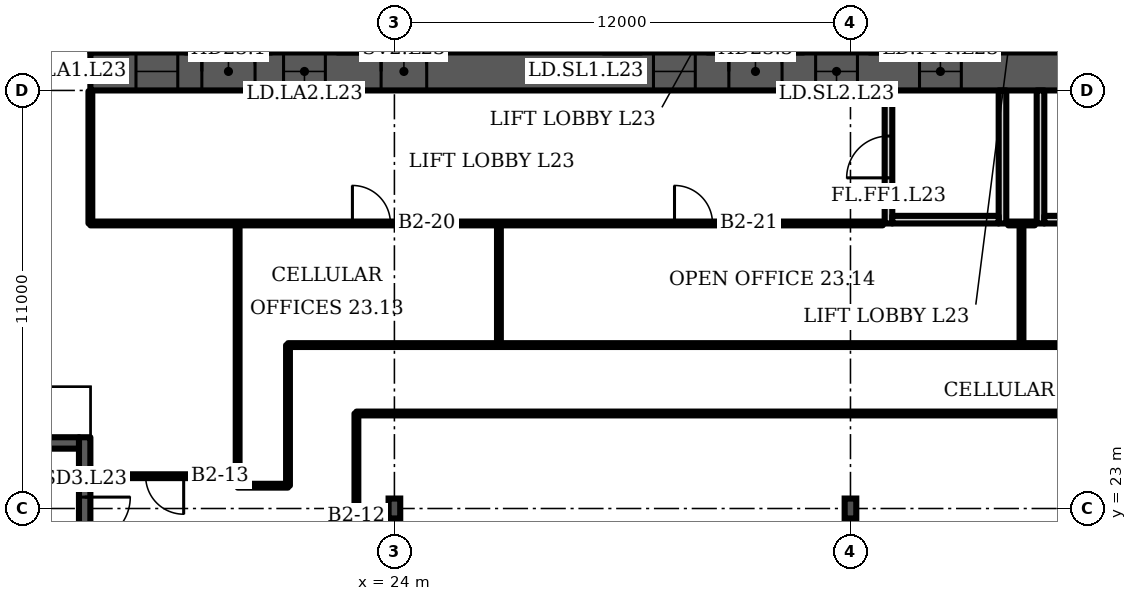
"""IFC4 building model, lengths in metres.
Left out: names, types, materials, properties, quantities, classifications, styles, units other than length and angle.
Written with IfcOpenShell. Run it as: python <this file> out.ifc"""

import sys

from ifc_helpers import new_model, si_unit, direction, frame, frame_2d, origin, origin_2d, place, context, subcontext, project, spatial, rectangle, i_section, extrude, element, fill, save


model = new_model("IFC4")
c1 = context("Model", 3, precision=1e-05, world=origin(), true_north=direction((0.0, 1.0)))
c2 = subcontext(c1, "Body", "Model", "MODEL_VIEW")
j1 = project(units=[si_unit("LENGTHUNIT", "METRE"), si_unit("PLANEANGLEUNIT", "RADIAN")], contexts=[c1])
p1 = place(None, origin())
s1 = spatial("IfcSite", under=j1, at=p1, CompositionType="ELEMENT")
p2 = place(p1, origin())
s2 = spatial("IfcBuilding", under=s1, at=p2, CompositionType="ELEMENT")
p3 = place(p2, frame((0.0, 0.0, 103.9)))
s3 = spatial("IfcBuildingStorey", under=s2, at=p3, CompositionType="ELEMENT", Elevation=103.9)
p4 = place(p3, frame((16.0, 34.5, 0.0), z_axis=(0.0, 0.0, 1.0), x_axis=(1.0, 0.0, 0.0)))
e1 = element("IfcWall", 1, at=p4, inside=s3, PredefinedType="SHEAR", context=c2, shape_type="SweptSolid", body=[
    extrude(rectangle(XDim=49.0, YDim=1.0, at=frame_2d((24.5, 0.0))), origin(), (0.0, 0.0, 1.0), 3.6),
])
p5 = place(p4, frame((1.2, 0.0, 0.0)))
e2 = element("IfcOpeningElement", 2, at=p5, cuts=e1, PredefinedType="OPENING", context=c2, shape_type="SweptSolid", body=[
    extrude(rectangle(XDim=1.1, YDim=2.1, at=frame_2d((0.55, 1.05))), frame((0.0, 0.51, 0.0), z_axis=(0.0, -1.0, 0.0), x_axis=(1.0, 0.0, 0.0)), (0.0, 0.0, 1.0), 1.02),
])
p6 = place(p4, frame((5.083, 0.0, 0.0)))
e3 = element("IfcOpeningElement", 3, at=p6, cuts=e1, PredefinedType="OPENING", context=c2, shape_type="SweptSolid", body=[
    extrude(rectangle(XDim=1.1, YDim=2.1, at=frame_2d((0.55, 1.05))), frame((0.0, 0.51, 0.0), z_axis=(0.0, -1.0, 0.0), x_axis=(1.0, 0.0, 0.0)), (0.0, 0.0, 1.0), 1.02),
])
p7 = place(p4, frame((2.933, 0.0, 0.0)))
e4 = element("IfcOpeningElement", 4, at=p7, cuts=e1, PredefinedType="OPENING", context=c2, shape_type="SweptSolid", body=[
    extrude(rectangle(XDim=1.4, YDim=2.1, at=frame_2d((0.7, 1.05))), frame((0.0, 0.51, 0.0), z_axis=(0.0, -1.0, 0.0), x_axis=(1.0, 0.0, 0.0)), (0.0, 0.0, 1.0), 1.02),
])
p8 = place(p4, frame((7.65, 0.0, 0.0)))
e5 = element("IfcOpeningElement", 5, at=p8, cuts=e1, PredefinedType="OPENING", context=c2, shape_type="SweptSolid", body=[
    extrude(rectangle(XDim=1.2, YDim=2.1, at=frame_2d((0.6, 1.05))), frame((0.0, 0.51, 0.0), z_axis=(0.0, -1.0, 0.0), x_axis=(1.0, 0.0, 0.0)), (0.0, 0.0, 1.0), 1.02),
])
p9 = place(p4, frame((14.817, 0.0, 0.0)))
e6 = element("IfcOpeningElement", 6, at=p9, cuts=e1, PredefinedType="OPENING", context=c2, shape_type="SweptSolid", body=[
    extrude(rectangle(XDim=1.1, YDim=2.1, at=frame_2d((0.55, 1.05))), frame((0.0, 0.51, 0.0), z_axis=(0.0, -1.0, 0.0), x_axis=(1.0, 0.0, 0.0)), (0.0, 0.0, 1.0), 1.02),
])
p10 = place(p4, frame((19.083, 0.0, 0.0)))
e7 = element("IfcOpeningElement", 7, at=p10, cuts=e1, PredefinedType="OPENING", context=c2, shape_type="SweptSolid", body=[
    extrude(rectangle(XDim=1.1, YDim=2.1, at=frame_2d((0.55, 1.05))), frame((0.0, 0.51, 0.0), z_axis=(0.0, -1.0, 0.0), x_axis=(1.0, 0.0, 0.0)), (0.0, 0.0, 1.0), 1.02),
])
p11 = place(p4, frame((16.8, 0.0, 0.0)))
e8 = element("IfcOpeningElement", 8, at=p11, cuts=e1, PredefinedType="OPENING", context=c2, shape_type="SweptSolid", body=[
    extrude(rectangle(XDim=1.4, YDim=2.1, at=frame_2d((0.7, 1.05))), frame((0.0, 0.51, 0.0), z_axis=(0.0, -1.0, 0.0), x_axis=(1.0, 0.0, 0.0)), (0.0, 0.0, 1.0), 1.02),
])
p12 = place(p4, frame((21.817, 0.0, 0.0)))
e9 = element("IfcOpeningElement", 9, at=p12, cuts=e1, PredefinedType="OPENING", context=c2, shape_type="SweptSolid", body=[
    extrude(rectangle(XDim=1.1, YDim=2.1, at=frame_2d((0.55, 1.05))), frame((0.0, 0.51, 0.0), z_axis=(0.0, -1.0, 0.0), x_axis=(1.0, 0.0, 0.0)), (0.0, 0.0, 1.0), 1.02),
])
p13 = place(p4, frame((26.083, 0.0, 0.0)))
e10 = element("IfcOpeningElement", 10, at=p13, cuts=e1, PredefinedType="OPENING", context=c2, shape_type="SweptSolid", body=[
    extrude(rectangle(XDim=1.1, YDim=2.1, at=frame_2d((0.55, 1.05))), frame((0.0, 0.51, 0.0), z_axis=(0.0, -1.0, 0.0), x_axis=(1.0, 0.0, 0.0)), (0.0, 0.0, 1.0), 1.02),
])
p14 = place(p4, frame((33.15, 0.0, 0.0)))
e11 = element("IfcOpeningElement", 11, at=p14, cuts=e1, PredefinedType="OPENING", context=c2, shape_type="SweptSolid", body=[
    extrude(rectangle(XDim=1.2, YDim=2.1, at=frame_2d((0.6, 1.05))), frame((0.0, 0.51, 0.0), z_axis=(0.0, -1.0, 0.0), x_axis=(1.0, 0.0, 0.0)), (0.0, 0.0, 1.0), 1.02),
])
p15 = place(p4, frame((37.8, 0.0, 0.0)))
e12 = element("IfcOpeningElement", 12, at=p15, cuts=e1, PredefinedType="OPENING", context=c2, shape_type="SweptSolid", body=[
    extrude(rectangle(XDim=1.4, YDim=2.1, at=frame_2d((0.7, 1.05))), frame((0.0, 0.51, 0.0), z_axis=(0.0, -1.0, 0.0), x_axis=(1.0, 0.0, 0.0)), (0.0, 0.0, 1.0), 1.02),
])
p16 = place(p4, frame((42.817, 0.0, 0.0)))
e13 = element("IfcOpeningElement", 13, at=p16, cuts=e1, PredefinedType="OPENING", context=c2, shape_type="SweptSolid", body=[
    extrude(rectangle(XDim=1.1, YDim=2.1, at=frame_2d((0.55, 1.05))), frame((0.0, 0.51, 0.0), z_axis=(0.0, -1.0, 0.0), x_axis=(1.0, 0.0, 0.0)), (0.0, 0.0, 1.0), 1.02),
])
p17 = place(p4, frame((46.7, 0.0, 0.0)))
e14 = element("IfcOpeningElement", 14, at=p17, cuts=e1, PredefinedType="OPENING", context=c2, shape_type="SweptSolid", body=[
    extrude(rectangle(XDim=1.1, YDim=2.1, at=frame_2d((0.55, 1.05))), frame((0.0, 0.51, 0.0), z_axis=(0.0, -1.0, 0.0), x_axis=(1.0, 0.0, 0.0)), (0.0, 0.0, 1.0), 1.02),
])
p18 = place(p4, frame((44.667, 0.0, 0.0)))
e15 = element("IfcOpeningElement", 15, at=p18, cuts=e1, PredefinedType="OPENING", context=c2, shape_type="SweptSolid", body=[
    extrude(rectangle(XDim=1.4, YDim=2.1, at=frame_2d((0.7, 1.05))), frame((0.0, 0.51, 0.0), z_axis=(0.0, -1.0, 0.0), x_axis=(1.0, 0.0, 0.0)), (0.0, 0.0, 1.0), 1.02),
])
for number, where, z_axis, x_axis in (
    (16, (24.0, 23.0, 0.0), (0.0, 0.0, 1.0), (1.0, 0.0, 0.0)),
    (17, (36.0, 23.0, 0.0), (0.0, 0.0, 1.0), (1.0, 0.0, 0.0)),
):
    element("IfcColumn", number, at=place(p3, frame(where, z_axis=z_axis, x_axis=x_axis)), inside=s3, PredefinedType="COLUMN", context=c2, shape_type="SweptSolid", body=[
        extrude(i_section(OverallWidth=0.306, OverallDepth=0.524, WebThickness=0.021, FlangeThickness=0.04, FilletRadius=0.027, at=origin_2d()), origin(), (0.0, 0.0, 1.0), 3.6),
    ])
p19 = place(p3, frame((37.0, 30.5, 0.0), z_axis=(0.0, 0.0, 1.0), x_axis=(0.0, 1.0, 0.0)))
e18 = element("IfcWall", 18, at=p19, inside=s3, PredefinedType="PARTITIONING", context=c2, shape_type="SweptSolid", body=[
    extrude(rectangle(XDim=3.5, YDim=0.2, at=frame_2d((1.75, 0.0))), origin(), (0.0, 0.0, 1.0), 3.2),
])
p20 = place(p19, frame((1.2, 0.0, 0.0)))
e19 = element("IfcOpeningElement", 19, at=p20, cuts=e18, PredefinedType="OPENING", context=c2, shape_type="SweptSolid", body=[
    extrude(rectangle(XDim=1.1, YDim=2.1, at=frame_2d((0.55, 1.05))), frame((0.0, 0.11, 0.0), z_axis=(0.0, -1.0, 0.0), x_axis=(1.0, 0.0, 0.0)), (0.0, 0.0, 1.0), 0.22),
])
p21 = place(p3, frame((40.0, 30.5, 0.0), z_axis=(0.0, 0.0, 1.0), x_axis=(0.0, 1.0, 0.0)))
e20 = element("IfcWall", 20, at=p21, inside=s3, PredefinedType="PARTITIONING", context=c2, shape_type="SweptSolid", body=[
    extrude(rectangle(XDim=3.5, YDim=0.2, at=frame_2d((1.75, 0.0))), origin(), (0.0, 0.0, 1.0), 3.2),
])
p22 = place(p3, frame((37.1, 30.6, 0.0), z_axis=(0.0, 0.0, 1.0), x_axis=(1.0, 0.0, 0.0)))
e21 = element("IfcWall", 21, at=p22, inside=s3, PredefinedType="PARTITIONING", context=c2, shape_type="SweptSolid", body=[
    extrude(rectangle(XDim=2.8, YDim=0.2, at=frame_2d((1.4, 0.0))), origin(), (0.0, 0.0, 1.0), 3.2),
])
p23 = place(p3, frame((41.0, 30.5, 0.0), z_axis=(0.0, 0.0, 1.0), x_axis=(0.0, 1.0, 0.0)))
e22 = element("IfcWall", 22, at=p23, inside=s3, PredefinedType="PARTITIONING", context=c2, shape_type="SweptSolid", body=[
    extrude(rectangle(XDim=3.5, YDim=0.2, at=frame_2d((1.75, 0.0))), origin(), (0.0, 0.0, 1.0), 3.2),
])
p24 = place(p3, frame((41.1, 30.6, 0.0), z_axis=(0.0, 0.0, 1.0), x_axis=(1.0, 0.0, 0.0)))
e23 = element("IfcWall", 23, at=p24, inside=s3, PredefinedType="PARTITIONING", context=c2, shape_type="SweptSolid", body=[
    extrude(rectangle(XDim=2.8, YDim=0.2, at=frame_2d((1.4, 0.0))), origin(), (0.0, 0.0, 1.0), 3.2),
])
p25 = place(p3, frame((15.85, 20.525, 0.0), z_axis=(0.0, 0.0, 1.0), x_axis=(0.0, 1.0, 0.0)))
e24 = element("IfcWall", 24, at=p25, inside=s3, PredefinedType="SHEAR", context=c2, shape_type="SweptSolid", body=[
    extrude(rectangle(XDim=4.35, YDim=0.3, at=frame_2d((2.175, 0.0))), origin(), (0.0, 0.0, 1.0), 3.2),
])
p26 = place(p25, frame((1.575, 0.0, 0.0)))
e25 = element("IfcOpeningElement", 25, at=p26, cuts=e24, PredefinedType="OPENING", context=c2, shape_type="SweptSolid", body=[
    extrude(rectangle(XDim=1.2, YDim=2.1, at=frame_2d((0.6, 1.05))), frame((0.0, 0.16, 0.0), z_axis=(0.0, -1.0, 0.0), x_axis=(1.0, 0.0, 0.0)), (0.0, 0.0, 1.0), 0.32),
])
p27 = place(p3, frame((16.0, 30.5, 0.0), z_axis=(0.0, 0.0, 1.0), x_axis=(0.0, 1.0, 0.0)))
e26 = element("IfcWall", 26, at=p27, inside=s3, PredefinedType="PARTITIONING", context=c2, shape_type="SweptSolid", body=[
    extrude(rectangle(XDim=3.48, YDim=0.1, at=frame_2d((1.74, 0.0))), origin(), (0.0, 0.0, 1.0), 3.2),
])
p28 = place(p3, frame((16.0, 30.5, 0.0), z_axis=(0.0, 0.0, 1.0), x_axis=(1.0, 0.0, 0.0)))
e27 = element("IfcWall", 27, at=p28, inside=s3, PredefinedType="PARTITIONING", context=c2, shape_type="SweptSolid", body=[
    extrude(rectangle(XDim=20.85, YDim=0.1, at=frame_2d((10.425, 0.0))), origin(), (0.0, 0.0, 1.0), 3.2),
])
p29 = place(p28, frame((6.895, 0.0, 0.0)))
e28 = element("IfcOpeningElement", 28, at=p29, cuts=e27, PredefinedType="OPENING", context=c2, shape_type="SweptSolid", body=[
    extrude(rectangle(XDim=1.0, YDim=2.1, at=frame_2d((0.5, 1.05))), frame((0.0, 0.06, 0.0), z_axis=(0.0, -1.0, 0.0), x_axis=(1.0, 0.0, 0.0)), (0.0, 0.0, 1.0), 0.12),
])
p30 = place(p28, frame((15.37, 0.0, 0.0)))
e29 = element("IfcOpeningElement", 29, at=p30, cuts=e27, PredefinedType="OPENING", context=c2, shape_type="SweptSolid", body=[
    extrude(rectangle(XDim=1.0, YDim=2.1, at=frame_2d((0.5, 1.05))), frame((0.0, 0.06, 0.0), z_axis=(0.0, -1.0, 0.0), x_axis=(1.0, 0.0, 0.0)), (0.0, 0.0, 1.0), 0.12),
])
p31 = place(p3, frame((16.02, 23.85, 0.0), z_axis=(0.0, 0.0, 1.0), x_axis=(1.0, 0.0, 0.0)))
e30 = element("IfcWall", 30, at=p31, inside=s3, PredefinedType="PARTITIONING", context=c2, shape_type="SweptSolid", body=[
    extrude(rectangle(XDim=3.855, YDim=0.1, at=frame_2d((1.927, 0.0))), origin(), (0.0, 0.0, 1.0), 3.2),
])
p32 = place(p31, frame((1.435, 0.0, 0.0)))
e31 = element("IfcOpeningElement", 31, at=p32, cuts=e30, PredefinedType="OPENING", context=c2, shape_type="SweptSolid", body=[
    extrude(rectangle(XDim=1.0, YDim=2.1, at=frame_2d((0.5, 1.05))), frame((0.0, 0.06, 0.0), z_axis=(0.0, -1.0, 0.0), x_axis=(1.0, 0.0, 0.0)), (0.0, 0.0, 1.0), 0.12),
])
p33 = place(p3, frame((19.875, 23.6, 0.0), z_axis=(0.0, 0.0, 1.0), x_axis=(0.0, 1.0, 0.0)))
e32 = element("IfcWall", 32, at=p33, inside=s3, PredefinedType="PARTITIONING", context=c2, shape_type="SweptSolid", body=[
    extrude(rectangle(XDim=6.9, YDim=0.1, at=frame_2d((3.45, 0.0))), origin(), (0.0, 0.0, 1.0), 3.2),
])
p34 = place(p3, frame((19.875, 23.6, 0.0), z_axis=(0.0, 0.0, 1.0), x_axis=(1.0, 0.0, 0.0)))
e33 = element("IfcWall", 33, at=p34, inside=s3, PredefinedType="PARTITIONING", context=c2, shape_type="SweptSolid", body=[
    extrude(rectangle(XDim=1.325, YDim=0.1, at=frame_2d((0.663, 0.0))), origin(), (0.0, 0.0, 1.0), 3.2),
])
p35 = place(p3, frame((21.2, 23.6, 0.0), z_axis=(0.0, 0.0, 1.0), x_axis=(0.0, 1.0, 0.0)))
e34 = element("IfcWall", 34, at=p35, inside=s3, PredefinedType="PARTITIONING", context=c2, shape_type="SweptSolid", body=[
    extrude(rectangle(XDim=3.7, YDim=0.1, at=frame_2d((1.85, 0.0))), origin(), (0.0, 0.0, 1.0), 3.2),
])
p36 = place(p3, frame((21.2, 27.3, 0.0), z_axis=(0.0, 0.0, 1.0), x_axis=(1.0, 0.0, 0.0)))
e35 = element("IfcWall", 35, at=p36, inside=s3, PredefinedType="PARTITIONING", context=c2, shape_type="SweptSolid", body=[
    extrude(rectangle(XDim=42.4, YDim=0.1, at=frame_2d((21.2, 0.0))), origin(), (0.0, 0.0, 1.0), 3.2),
])
p37 = place(p36, frame((22.275, 0.0, 0.0)))
e36 = element("IfcOpeningElement", 36, at=p37, cuts=e35, PredefinedType="OPENING", context=c2, shape_type="SweptSolid", body=[
    extrude(rectangle(XDim=1.0, YDim=2.1, at=frame_2d((0.5, 1.05))), frame((0.0, 0.06, 0.0), z_axis=(0.0, -1.0, 0.0), x_axis=(1.0, 0.0, 0.0)), (0.0, 0.0, 1.0), 0.12),
])
p38 = place(p36, frame((27.73, 0.0, 0.0)))
e37 = element("IfcOpeningElement", 37, at=p38, cuts=e35, PredefinedType="OPENING", context=c2, shape_type="SweptSolid", body=[
    extrude(rectangle(XDim=1.0, YDim=2.1, at=frame_2d((0.5, 1.05))), frame((0.0, 0.06, 0.0), z_axis=(0.0, -1.0, 0.0), x_axis=(1.0, 0.0, 0.0)), (0.0, 0.0, 1.0), 0.12),
])
p39 = place(p36, frame((31.785, 0.0, 0.0)))
e38 = element("IfcOpeningElement", 38, at=p39, cuts=e35, PredefinedType="OPENING", context=c2, shape_type="SweptSolid", body=[
    extrude(rectangle(XDim=1.0, YDim=2.1, at=frame_2d((0.5, 1.05))), frame((0.0, 0.06, 0.0), z_axis=(0.0, -1.0, 0.0), x_axis=(1.0, 0.0, 0.0)), (0.0, 0.0, 1.0), 0.12),
])
p40 = place(p36, frame((35.845, 0.0, 0.0)))
e39 = element("IfcOpeningElement", 39, at=p40, cuts=e35, PredefinedType="OPENING", context=c2, shape_type="SweptSolid", body=[
    extrude(rectangle(XDim=1.0, YDim=2.1, at=frame_2d((0.5, 1.05))), frame((0.0, 0.06, 0.0), z_axis=(0.0, -1.0, 0.0), x_axis=(1.0, 0.0, 0.0)), (0.0, 0.0, 1.0), 0.12),
])
p41 = place(p36, frame((39.9, 0.0, 0.0)))
e40 = element("IfcOpeningElement", 40, at=p41, cuts=e35, PredefinedType="OPENING", context=c2, shape_type="SweptSolid", body=[
    extrude(rectangle(XDim=1.0, YDim=2.1, at=frame_2d((0.5, 1.05))), frame((0.0, 0.06, 0.0), z_axis=(0.0, -1.0, 0.0), x_axis=(1.0, 0.0, 0.0)), (0.0, 0.0, 1.0), 0.12),
])
p42 = place(p3, frame((23.0, 7.485, 0.0), z_axis=(0.0, 0.0, 1.0), x_axis=(0.0, 1.0, 0.0)))
e41 = element("IfcWall", 41, at=p42, inside=s3, PredefinedType="PARTITIONING", context=c2, shape_type="SweptSolid", body=[
    extrude(rectangle(XDim=18.015, YDim=0.1, at=frame_2d((9.007, 0.0))), origin(), (0.0, 0.0, 1.0), 3.2),
])
p43 = place(p42, frame((13.029, 0.0, 0.0)))
e42 = element("IfcOpeningElement", 42, at=p43, cuts=e41, PredefinedType="OPENING", context=c2, shape_type="SweptSolid", body=[
    extrude(rectangle(XDim=1.8, YDim=2.1, at=frame_2d((0.9, 1.05))), frame((0.0, 0.06, 0.0), z_axis=(0.0, -1.0, 0.0), x_axis=(1.0, 0.0, 0.0)), (0.0, 0.0, 1.0), 0.12),
])
p44 = place(p3, frame((23.0, 25.5, 0.0), z_axis=(0.0, 0.0, 1.0), x_axis=(1.0, 0.0, 0.0)))
e43 = element("IfcWall", 43, at=p44, inside=s3, PredefinedType="PARTITIONING", context=c2, shape_type="SweptSolid", body=[
    extrude(rectangle(XDim=44.49, YDim=0.1, at=frame_2d((22.245, 0.0))), origin(), (0.0, 0.0, 1.0), 3.2),
])
for number, where, z_axis, x_axis in (
    (44, (26.75, 27.3, 0.0), (0.0, 0.0, 1.0), (0.0, 1.0, 0.0)),
    (45, (40.5, 27.3, 0.0), (0.0, 0.0, 1.0), (0.0, 1.0, 0.0)),
):
    element("IfcWall", number, at=place(p3, frame(where, z_axis=z_axis, x_axis=x_axis)), inside=s3, PredefinedType="PARTITIONING", context=c2, shape_type="SweptSolid", body=[
        extrude(rectangle(XDim=3.2, YDim=0.1, at=frame_2d((1.6, 0.0))), origin(), (0.0, 0.0, 1.0), 3.2),
    ])
p45 = place(p3, frame((40.15, 30.5, 0.0), z_axis=(0.0, 0.0, 1.0), x_axis=(1.0, 0.0, 0.0)))
e46 = element("IfcWall", 46, at=p45, inside=s3, PredefinedType="PARTITIONING", context=c2, shape_type="SweptSolid", body=[
    extrude(rectangle(XDim=0.7, YDim=0.1, at=frame_2d((0.35, 0.0))), origin(), (0.0, 0.0, 1.0), 3.2),
])
p46 = place(p3, frame((8.2, 24.725, 0.0), z_axis=(0.0, 0.0, 1.0), x_axis=(1.0, 0.0, 0.0)))
e47 = element("IfcWall", 47, at=p46, inside=s3, PredefinedType="SHEAR", context=c2, shape_type="SweptSolid", body=[
    extrude(rectangle(XDim=7.5, YDim=0.3, at=frame_2d((3.75, 0.0))), origin(), (0.0, 0.0, 1.0), 3.2),
])
p47 = place(p5, origin())
e48 = element("IfcDoor", 48, at=p47, inside=s3, OperationType="DOUBLE_DOOR_SLIDING", PredefinedType="DOOR", context=c2, shape_type="SweptSolid", body=[
    extrude(rectangle(XDim=1.1, YDim=2.1, at=frame_2d((0.55, 1.05))), frame((0.0, 0.025, 0.0), z_axis=(0.0, -1.0, 0.0), x_axis=(1.0, 0.0, 0.0)), (0.0, 0.0, 1.0), 0.05),
])
fill(e2, e48)
p48 = place(p6, origin())
e49 = element("IfcDoor", 49, at=p48, inside=s3, OperationType="DOUBLE_DOOR_SLIDING", PredefinedType="DOOR", context=c2, shape_type="SweptSolid", body=[
    extrude(rectangle(XDim=1.1, YDim=2.1, at=frame_2d((0.55, 1.05))), frame((0.0, 0.025, 0.0), z_axis=(0.0, -1.0, 0.0), x_axis=(1.0, 0.0, 0.0)), (0.0, 0.0, 1.0), 0.05),
])
fill(e3, e49)
p49 = place(p7, origin())
e50 = element("IfcDoor", 50, at=p49, inside=s3, OperationType="DOUBLE_DOOR_SINGLE_SWING", PredefinedType="DOOR", context=c2, shape_type="SweptSolid", body=[
    extrude(rectangle(XDim=1.4, YDim=2.1, at=frame_2d((0.7, 1.05))), frame((0.0, 0.025, 0.0), z_axis=(0.0, -1.0, 0.0), x_axis=(1.0, 0.0, 0.0)), (0.0, 0.0, 1.0), 0.05),
])
fill(e4, e50)
p50 = place(p8, origin())
e51 = element("IfcDoor", 51, at=p50, inside=s3, OperationType="SINGLE_SWING_LEFT", PredefinedType="DOOR", context=c2, shape_type="SweptSolid", body=[
    extrude(rectangle(XDim=1.2, YDim=2.1, at=frame_2d((0.6, 1.05))), frame((0.0, 0.025, 0.0), z_axis=(0.0, -1.0, 0.0), x_axis=(1.0, 0.0, 0.0)), (0.0, 0.0, 1.0), 0.05),
])
fill(e5, e51)
p51 = place(p9, origin())
e52 = element("IfcDoor", 52, at=p51, inside=s3, OperationType="DOUBLE_DOOR_SLIDING", PredefinedType="DOOR", context=c2, shape_type="SweptSolid", body=[
    extrude(rectangle(XDim=1.1, YDim=2.1, at=frame_2d((0.55, 1.05))), frame((0.0, 0.025, 0.0), z_axis=(0.0, -1.0, 0.0), x_axis=(1.0, 0.0, 0.0)), (0.0, 0.0, 1.0), 0.05),
])
fill(e6, e52)
p52 = place(p10, origin())
e53 = element("IfcDoor", 53, at=p52, inside=s3, OperationType="DOUBLE_DOOR_SLIDING", PredefinedType="DOOR", context=c2, shape_type="SweptSolid", body=[
    extrude(rectangle(XDim=1.1, YDim=2.1, at=frame_2d((0.55, 1.05))), frame((0.0, 0.025, 0.0), z_axis=(0.0, -1.0, 0.0), x_axis=(1.0, 0.0, 0.0)), (0.0, 0.0, 1.0), 0.05),
])
fill(e7, e53)
p53 = place(p11, origin())
e54 = element("IfcDoor", 54, at=p53, inside=s3, OperationType="DOUBLE_DOOR_SINGLE_SWING", PredefinedType="DOOR", context=c2, shape_type="SweptSolid", body=[
    extrude(rectangle(XDim=1.4, YDim=2.1, at=frame_2d((0.7, 1.05))), frame((0.0, 0.025, 0.0), z_axis=(0.0, -1.0, 0.0), x_axis=(1.0, 0.0, 0.0)), (0.0, 0.0, 1.0), 0.05),
])
fill(e8, e54)
p54 = place(p12, origin())
e55 = element("IfcDoor", 55, at=p54, inside=s3, OperationType="DOUBLE_DOOR_SLIDING", PredefinedType="DOOR", context=c2, shape_type="SweptSolid", body=[
    extrude(rectangle(XDim=1.1, YDim=2.1, at=frame_2d((0.55, 1.05))), frame((0.0, 0.025, 0.0), z_axis=(0.0, -1.0, 0.0), x_axis=(1.0, 0.0, 0.0)), (0.0, 0.0, 1.0), 0.05),
])
fill(e9, e55)
p55 = place(p20, origin())
e56 = element("IfcDoor", 56, at=p55, inside=s3, OperationType="SINGLE_SWING_LEFT", PredefinedType="DOOR", context=c2, shape_type="SweptSolid", body=[
    extrude(rectangle(XDim=1.1, YDim=2.1, at=frame_2d((0.55, 1.05))), frame((0.0, 0.025, 0.0), z_axis=(0.0, -1.0, 0.0), x_axis=(1.0, 0.0, 0.0)), (0.0, 0.0, 1.0), 0.05),
])
fill(e19, e56)
p56 = place(p26, origin())
e57 = element("IfcDoor", 57, at=p56, inside=s3, OperationType="SINGLE_SWING_RIGHT", PredefinedType="DOOR", context=c2, shape_type="SweptSolid", body=[
    extrude(rectangle(XDim=1.2, YDim=2.1, at=frame_2d((0.6, 1.05))), frame((0.0, 0.025, 0.0), z_axis=(0.0, -1.0, 0.0), x_axis=(1.0, 0.0, 0.0)), (0.0, 0.0, 1.0), 0.05),
])
fill(e25, e57)
p57 = place(p32, origin())
e58 = element("IfcDoor", 58, at=p57, inside=s3, OperationType="SINGLE_SWING_RIGHT", PredefinedType="DOOR", context=c2, shape_type="SweptSolid", body=[
    extrude(rectangle(XDim=1.0, YDim=2.1, at=frame_2d((0.5, 1.05))), frame((0.0, 0.025, 0.0), z_axis=(0.0, -1.0, 0.0), x_axis=(1.0, 0.0, 0.0)), (0.0, 0.0, 1.0), 0.05),
])
fill(e31, e58)
p58 = place(p29, origin())
e59 = element("IfcDoor", 59, at=p58, inside=s3, OperationType="SINGLE_SWING_LEFT", PredefinedType="DOOR", context=c2, shape_type="SweptSolid", body=[
    extrude(rectangle(XDim=1.0, YDim=2.1, at=frame_2d((0.5, 1.05))), frame((0.0, 0.025, 0.0), z_axis=(0.0, -1.0, 0.0), x_axis=(1.0, 0.0, 0.0)), (0.0, 0.0, 1.0), 0.05),
])
fill(e28, e59)
p59 = place(p30, origin())
e60 = element("IfcDoor", 60, at=p59, inside=s3, OperationType="SINGLE_SWING_LEFT", PredefinedType="DOOR", context=c2, shape_type="SweptSolid", body=[
    extrude(rectangle(XDim=1.0, YDim=2.1, at=frame_2d((0.5, 1.05))), frame((0.0, 0.025, 0.0), z_axis=(0.0, -1.0, 0.0), x_axis=(1.0, 0.0, 0.0)), (0.0, 0.0, 1.0), 0.05),
])
fill(e29, e60)
save(model, sys.argv[1])
